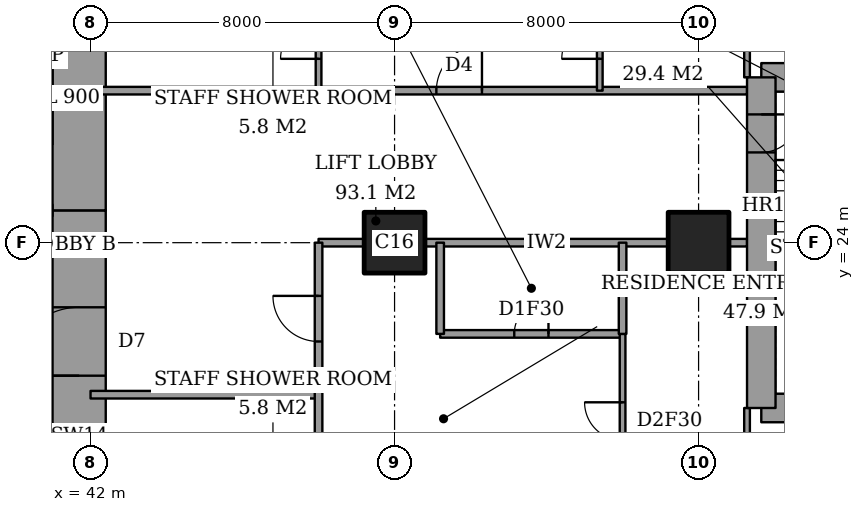
"""IFC4 building model, lengths in metres.
Left out: names, types, materials, properties, quantities, classifications, styles, units other than length and angle.
Written with IfcOpenShell. Run it as: python <this file> out.ifc"""

import sys

from ifc_helpers import new_model, si_unit, direction, frame, frame_2d, origin, origin_2d, place, context, subcontext, project, spatial, rectangle, extrude, element, fill, save


model = new_model("IFC4")
c1 = context("Model", 3, precision=1e-05, world=origin(), true_north=direction((0.0, 1.0)))
c2 = subcontext(c1, "Body", "Model", "MODEL_VIEW")
j1 = project(units=[si_unit("LENGTHUNIT", "METRE"), si_unit("PLANEANGLEUNIT", "RADIAN")], contexts=[c1])
p1 = place(None, origin())
s1 = spatial("IfcSite", under=j1, at=p1, CompositionType="ELEMENT")
p2 = place(p1, origin())
s2 = spatial("IfcBuilding", under=s1, at=p2, CompositionType="ELEMENT")
p3 = place(p2, frame((0.0, 0.0, 270.0)))
s3 = spatial("IfcBuildingStorey", under=s2, at=p3, CompositionType="ELEMENT", Elevation=270.0)
for number, where, z_axis, x_axis in (
    (1, (50.0, 24.0, 0.0), (0.0, 0.0, 1.0), (1.0, 0.0, 0.0)),
    (2, (58.0, 24.0, 0.0), (0.0, 0.0, 1.0), (1.0, 0.0, 0.0)),
):
    element("IfcColumn", number, at=place(p3, frame(where, z_axis=z_axis, x_axis=x_axis)), inside=s3, PredefinedType="COLUMN", context=c2, shape_type="SweptSolid", body=[
        extrude(rectangle(XDim=1.6, YDim=1.6, at=origin_2d()), origin(), (0.0, 0.0, 1.0), 3.6),
    ])
p4 = place(p3, frame((41.7, 13.0, 0.0), z_axis=(0.0, 0.0, 1.0), x_axis=(0.0, 1.0, 0.0)))
e3 = element("IfcWall", 3, at=p4, inside=s3, PredefinedType="SHEAR", context=c2, shape_type="SweptSolid", body=[
    extrude(rectangle(XDim=11.85, YDim=1.4, at=frame_2d((5.925, 0.0))), origin(), (0.0, 0.0, 1.0), 3.6),
])
p5 = place(p4, frame((7.5, 0.0, 0.0)))
e4 = element("IfcOpeningElement", 4, at=p5, cuts=e3, PredefinedType="OPENING", context=c2, shape_type="SweptSolid", body=[
    extrude(rectangle(XDim=1.8, YDim=2.4, at=frame_2d((0.9, 1.2))), frame((0.0, 0.71, 0.0), z_axis=(0.0, -1.0, 0.0), x_axis=(1.0, 0.0, 0.0)), (0.0, 0.0, 1.0), 1.42),
])
p6 = place(p3, frame((41.7, 24.85, 0.0), z_axis=(0.0, 0.0, 1.0), x_axis=(0.0, 1.0, 0.0)))
e5 = element("IfcWall", 5, at=p6, inside=s3, PredefinedType="SHEAR", context=c2, shape_type="SweptSolid", body=[
    extrude(rectangle(XDim=10.15, YDim=1.4, at=frame_2d((5.075, 0.0))), origin(), (0.0, 0.0, 1.0), 3.6),
])
for number, where, z_axis, x_axis in (
    (6, (59.65, 19.65, 0.0), (0.0, 0.0, 1.0), (1.0, 0.0, 0.0)),
    (7, (64.1, 28.35, 0.0), (0.0, 0.0, 1.0), (-1.0, 0.0, 0.0)),
):
    element("IfcWall", number, at=place(p3, frame(where, z_axis=z_axis, x_axis=x_axis)), inside=s3, PredefinedType="SHEAR", context=c2, shape_type="SweptSolid", body=[
        extrude(rectangle(XDim=4.45, YDim=0.75, at=frame_2d((2.225, 0.0))), origin(), (0.0, 0.0, 1.0), 3.6),
    ])
p7 = place(p3, frame((59.65, 28.35, 0.0), z_axis=(0.0, 0.0, 1.0), x_axis=(0.0, -1.0, 0.0)))
e8 = element("IfcWall", 8, at=p7, inside=s3, PredefinedType="SHEAR", context=c2, shape_type="SweptSolid", body=[
    extrude(rectangle(XDim=8.7, YDim=0.75, at=frame_2d((4.35, 0.0))), origin(), (0.0, 0.0, 1.0), 3.6),
])
p8 = place(p7, frame((0.975, 0.0, 0.0)))
e9 = element("IfcOpeningElement", 9, at=p8, cuts=e8, PredefinedType="OPENING", context=c2, shape_type="SweptSolid", body=[
    extrude(rectangle(XDim=1.0, YDim=2.1, at=frame_2d((0.5, 1.05))), frame((0.0, 0.385, 0.0), z_axis=(0.0, -1.0, 0.0), x_axis=(1.0, 0.0, 0.0)), (0.0, 0.0, 1.0), 0.77),
])
p9 = place(p3, frame((42.0, 20.0, 0.0), z_axis=(0.0, 0.0, 1.0), x_axis=(1.0, 0.0, 0.0)))
e10 = element("IfcWall", 10, at=p9, inside=s3, PredefinedType="PARTITIONING", context=c2, shape_type="SweptSolid", body=[
    extrude(rectangle(XDim=6.0, YDim=0.2, at=frame_2d((3.0, 0.0))), origin(), (0.0, 0.0, 1.0), 3.35),
])
p10 = place(p3, frame((51.2, 21.6, 0.0), z_axis=(0.0, 0.0, 1.0), x_axis=(1.0, 0.0, 0.0)))
e11 = element("IfcWall", 11, at=p10, inside=s3, PredefinedType="PARTITIONING", context=c2, shape_type="SweptSolid", body=[
    extrude(rectangle(XDim=4.8, YDim=0.2, at=frame_2d((2.4, 0.0))), origin(), (0.0, 0.0, 1.0), 3.35),
])
p11 = place(p10, frame((1.95, 0.0, 0.0)))
e12 = element("IfcOpeningElement", 12, at=p11, cuts=e11, PredefinedType="OPENING", context=c2, shape_type="SweptSolid", body=[
    extrude(rectangle(XDim=0.9, YDim=2.1, at=frame_2d((0.45, 1.05))), frame((0.0, 0.11, 0.0), z_axis=(0.0, -1.0, 0.0), x_axis=(1.0, 0.0, 0.0)), (0.0, 0.0, 1.0), 0.22),
])
p12 = place(p3, frame((48.0, 24.0, 0.0), z_axis=(0.0, 0.0, 1.0), x_axis=(1.0, 0.0, 0.0)))
e13 = element("IfcWall", 13, at=p12, inside=s3, PredefinedType="PARTITIONING", context=c2, shape_type="SweptSolid", body=[
    extrude(rectangle(XDim=1.2, YDim=0.2, at=frame_2d((0.6, 0.0))), origin(), (0.0, 0.0, 1.0), 3.35),
])
p13 = place(p3, frame((50.8, 24.0, 0.0), z_axis=(0.0, 0.0, 1.0), x_axis=(1.0, 0.0, 0.0)))
e14 = element("IfcWall", 14, at=p13, inside=s3, PredefinedType="PARTITIONING", context=c2, shape_type="SweptSolid", body=[
    extrude(rectangle(XDim=6.4, YDim=0.2, at=frame_2d((3.2, 0.0))), origin(), (0.0, 0.0, 1.0), 3.35),
])
p14 = place(p3, frame((58.8, 24.0, 0.0), z_axis=(0.0, 0.0, 1.0), x_axis=(1.0, 0.0, 0.0)))
e15 = element("IfcWall", 15, at=p14, inside=s3, PredefinedType="PARTITIONING", context=c2, shape_type="SweptSolid", body=[
    extrude(rectangle(XDim=0.475, YDim=0.2, at=frame_2d((0.237, 0.0))), origin(), (0.0, 0.0, 1.0), 3.35),
])
p15 = place(p3, frame((42.0, 28.0, 0.0), z_axis=(0.0, 0.0, 1.0), x_axis=(1.0, 0.0, 0.0)))
e16 = element("IfcWall", 16, at=p15, inside=s3, PredefinedType="PARTITIONING", context=c2, shape_type="SweptSolid", body=[
    extrude(rectangle(XDim=17.275, YDim=0.2, at=frame_2d((8.637, 0.0))), origin(), (0.0, 0.0, 1.0), 3.35),
])
p16 = place(p15, frame((9.1, 0.0, 0.0)))
e17 = element("IfcOpeningElement", 17, at=p16, cuts=e16, PredefinedType="OPENING", context=c2, shape_type="SweptSolid", body=[
    extrude(rectangle(XDim=1.2, YDim=2.4, at=frame_2d((0.6, 1.2))), frame((0.0, 0.11, 0.0), z_axis=(0.0, -1.0, 0.0), x_axis=(1.0, 0.0, 0.0)), (0.0, 0.0, 1.0), 0.22),
])
p17 = place(p3, frame((48.0, 17.0, 0.0), z_axis=(0.0, 0.0, 1.0), x_axis=(0.0, 1.0, 0.0)))
e18 = element("IfcWall", 18, at=p17, inside=s3, PredefinedType="PARTITIONING", context=c2, shape_type="SweptSolid", body=[
    extrude(rectangle(XDim=7.0, YDim=0.2, at=frame_2d((3.5, 0.0))), origin(), (0.0, 0.0, 1.0), 3.35),
])
p18 = place(p17, frame((4.4, 0.0, 0.0)))
e19 = element("IfcOpeningElement", 19, at=p18, cuts=e18, PredefinedType="OPENING", context=c2, shape_type="SweptSolid", body=[
    extrude(rectangle(XDim=1.2, YDim=2.4, at=frame_2d((0.6, 1.2))), frame((0.0, 0.11, 0.0), z_axis=(0.0, -1.0, 0.0), x_axis=(1.0, 0.0, 0.0)), (0.0, 0.0, 1.0), 0.22),
])
p19 = place(p17, frame((1.05, 0.0, 0.0)))
e20 = element("IfcOpeningElement", 20, at=p19, cuts=e18, PredefinedType="OPENING", context=c2, shape_type="SweptSolid", body=[
    extrude(rectangle(XDim=0.9, YDim=2.1, at=frame_2d((0.45, 1.05))), frame((0.0, 0.11, 0.0), z_axis=(0.0, -1.0, 0.0), x_axis=(1.0, 0.0, 0.0)), (0.0, 0.0, 1.0), 0.22),
])
p20 = place(p3, frame((48.0, 28.0, 0.0), z_axis=(0.0, 0.0, 1.0), x_axis=(0.0, 1.0, 0.0)))
e21 = element("IfcWall", 21, at=p20, inside=s3, PredefinedType="PARTITIONING", context=c2, shape_type="SweptSolid", body=[
    extrude(rectangle(XDim=9.4, YDim=0.15, at=frame_2d((4.7, 0.0))), origin(), (0.0, 0.0, 1.0), 3.35),
])
p21 = place(p20, frame((0.837, 0.0, 0.0)))
e22 = element("IfcOpeningElement", 22, at=p21, cuts=e21, PredefinedType="OPENING", context=c2, shape_type="SweptSolid", body=[
    extrude(rectangle(XDim=1.0, YDim=2.1, at=frame_2d((0.5, 1.05))), frame((0.0, 0.085, 0.0), z_axis=(0.0, -1.0, 0.0), x_axis=(1.0, 0.0, 0.0)), (0.0, 0.0, 1.0), 0.17),
])
p22 = place(p3, frame((51.2, 21.6, 0.0), z_axis=(0.0, 0.0, 1.0), x_axis=(0.0, 1.0, 0.0)))
e23 = element("IfcWall", 23, at=p22, inside=s3, PredefinedType="PARTITIONING", context=c2, shape_type="SweptSolid", body=[
    extrude(rectangle(XDim=2.4, YDim=0.2, at=frame_2d((1.2, 0.0))), origin(), (0.0, 0.0, 1.0), 3.35),
])
p23 = place(p3, frame((55.4, 28.0, 0.0), z_axis=(0.0, 0.0, 1.0), x_axis=(0.0, 1.0, 0.0)))
e24 = element("IfcWall", 24, at=p23, inside=s3, PredefinedType="PARTITIONING", context=c2, shape_type="SweptSolid", body=[
    extrude(rectangle(XDim=9.4, YDim=0.15, at=frame_2d((4.7, 0.0))), origin(), (0.0, 0.0, 1.0), 3.35),
])
p24 = place(p23, frame((0.837, 0.0, 0.0)))
e25 = element("IfcOpeningElement", 25, at=p24, cuts=e24, PredefinedType="OPENING", context=c2, shape_type="SweptSolid", body=[
    extrude(rectangle(XDim=1.0, YDim=2.1, at=frame_2d((0.5, 1.05))), frame((0.0, 0.085, 0.0), z_axis=(0.0, -1.0, 0.0), x_axis=(1.0, 0.0, 0.0)), (0.0, 0.0, 1.0), 0.17),
])
p25 = place(p3, frame((56.0, 21.6, 0.0), z_axis=(0.0, 0.0, 1.0), x_axis=(0.0, 1.0, 0.0)))
e26 = element("IfcWall", 26, at=p25, inside=s3, PredefinedType="PARTITIONING", context=c2, shape_type="SweptSolid", body=[
    extrude(rectangle(XDim=2.4, YDim=0.2, at=frame_2d((1.2, 0.0))), origin(), (0.0, 0.0, 1.0), 3.35),
])
p26 = place(p3, frame((56.0, 10.6, 0.0), z_axis=(0.0, 0.0, 1.0), x_axis=(0.0, 1.0, 0.0)))
e27 = element("IfcWall", 27, at=p26, inside=s3, PredefinedType="PARTITIONING", context=c2, shape_type="SweptSolid", body=[
    extrude(rectangle(XDim=11.0, YDim=0.15, at=frame_2d((5.5, 0.0))), origin(), (0.0, 0.0, 1.0), 3.35),
])
p27 = place(p26, frame((8.2, 0.0, 0.0)))
e28 = element("IfcOpeningElement", 28, at=p27, cuts=e27, PredefinedType="OPENING", context=c2, shape_type="SweptSolid", body=[
    extrude(rectangle(XDim=1.0, YDim=2.1, at=frame_2d((0.5, 1.05))), frame((0.0, 0.085, 0.0), z_axis=(0.0, -1.0, 0.0), x_axis=(1.0, 0.0, 0.0)), (0.0, 0.0, 1.0), 0.17),
])
p28 = place(p3, frame((59.275, 17.2, 0.0), z_axis=(0.0, 0.0, 1.0), x_axis=(0.0, 1.0, 0.0)))
e29 = element("IfcWall", 29, at=p28, inside=s3, PredefinedType="PARTITIONING", context=c2, shape_type="SweptSolid", body=[
    extrude(rectangle(XDim=2.45, YDim=0.15, at=frame_2d((1.225, 0.0))), origin(), (0.0, 0.0, 1.0), 3.35),
])
p29 = place(p28, frame((0.538, 0.0, 0.0)))
e30 = element("IfcOpeningElement", 30, at=p29, cuts=e29, PredefinedType="OPENING", context=c2, shape_type="SweptSolid", body=[
    extrude(rectangle(XDim=1.0, YDim=2.1, at=frame_2d((0.5, 1.05))), frame((0.0, 0.085, 0.0), z_axis=(0.0, -1.0, 0.0), x_axis=(1.0, 0.0, 0.0)), (0.0, 0.0, 1.0), 0.17),
])
p30 = place(p3, frame((59.275, 28.35, 0.0), z_axis=(0.0, 0.0, 1.0), x_axis=(0.0, 1.0, 0.0)))
e31 = element("IfcWall", 31, at=p30, inside=s3, PredefinedType="PARTITIONING", context=c2, shape_type="SweptSolid", body=[
    extrude(rectangle(XDim=2.45, YDim=0.15, at=frame_2d((1.225, 0.0))), origin(), (0.0, 0.0, 1.0), 3.35),
])
p31 = place(p30, frame((0.913, 0.0, 0.0)))
e32 = element("IfcOpeningElement", 32, at=p31, cuts=e31, PredefinedType="OPENING", context=c2, shape_type="SweptSolid", body=[
    extrude(rectangle(XDim=1.0, YDim=2.1, at=frame_2d((0.5, 1.05))), frame((0.0, 0.085, 0.0), z_axis=(0.0, -1.0, 0.0), x_axis=(1.0, 0.0, 0.0)), (0.0, 0.0, 1.0), 0.17),
])
p32 = place(p27, origin())
e33 = element("IfcDoor", 33, at=p32, inside=s3, OperationType="SINGLE_SWING_LEFT", PredefinedType="DOOR", context=c2, shape_type="SweptSolid", body=[
    extrude(rectangle(XDim=1.0, YDim=2.1, at=frame_2d((0.5, 1.05))), frame((0.0, 0.025, 0.0), z_axis=(0.0, -1.0, 0.0), x_axis=(1.0, 0.0, 0.0)), (0.0, 0.0, 1.0), 0.05),
])
fill(e28, e33)
p33 = place(p11, origin())
e34 = element("IfcDoor", 34, at=p33, inside=s3, OperationType="SINGLE_SWING_LEFT", PredefinedType="DOOR", context=c2, shape_type="SweptSolid", body=[
    extrude(rectangle(XDim=0.9, YDim=2.1, at=frame_2d((0.45, 1.05))), frame((0.0, 0.025, 0.0), z_axis=(0.0, -1.0, 0.0), x_axis=(1.0, 0.0, 0.0)), (0.0, 0.0, 1.0), 0.05),
])
fill(e12, e34)
p34 = place(p18, origin())
e35 = element("IfcDoor", 35, at=p34, inside=s3, OperationType="SINGLE_SWING_LEFT", PredefinedType="DOOR", context=c2, shape_type="SweptSolid", body=[
    extrude(rectangle(XDim=1.2, YDim=2.4, at=frame_2d((0.6, 1.2))), frame((0.0, 0.025, 0.0), z_axis=(0.0, -1.0, 0.0), x_axis=(1.0, 0.0, 0.0)), (0.0, 0.0, 1.0), 0.05),
])
fill(e19, e35)
p35 = place(p24, origin())
e36 = element("IfcDoor", 36, at=p35, inside=s3, OperationType="SINGLE_SWING_RIGHT", PredefinedType="DOOR", context=c2, shape_type="SweptSolid", body=[
    extrude(rectangle(XDim=1.0, YDim=2.1, at=frame_2d((0.5, 1.05))), frame((0.0, 0.025, 0.0), z_axis=(0.0, -1.0, 0.0), x_axis=(1.0, 0.0, 0.0)), (0.0, 0.0, 1.0), 0.05),
])
fill(e25, e36)
p36 = place(p16, origin())
e37 = element("IfcDoor", 37, at=p36, inside=s3, OperationType="SINGLE_SWING_LEFT", PredefinedType="DOOR", context=c2, shape_type="SweptSolid", body=[
    extrude(rectangle(XDim=1.2, YDim=2.4, at=frame_2d((0.6, 1.2))), frame((0.0, 0.025, 0.0), z_axis=(0.0, -1.0, 0.0), x_axis=(1.0, 0.0, 0.0)), (0.0, 0.0, 1.0), 0.05),
])
fill(e17, e37)
p37 = place(p21, origin())
e38 = element("IfcDoor", 38, at=p37, inside=s3, OperationType="SINGLE_SWING_RIGHT", PredefinedType="DOOR", context=c2, shape_type="SweptSolid", body=[
    extrude(rectangle(XDim=1.0, YDim=2.1, at=frame_2d((0.5, 1.05))), frame((0.0, 0.025, 0.0), z_axis=(0.0, -1.0, 0.0), x_axis=(1.0, 0.0, 0.0)), (0.0, 0.0, 1.0), 0.05),
])
fill(e22, e38)
p38 = place(p5, origin())
e39 = element("IfcDoor", 39, at=p38, inside=s3, OperationType="DOUBLE_DOOR_DOUBLE_SWING", PredefinedType="DOOR", context=c2, shape_type="SweptSolid", body=[
    extrude(rectangle(XDim=1.8, YDim=2.4, at=frame_2d((0.9, 1.2))), frame((0.0, 0.025, 0.0), z_axis=(0.0, -1.0, 0.0), x_axis=(1.0, 0.0, 0.0)), (0.0, 0.0, 1.0), 0.05),
])
fill(e4, e39)
p39 = place(p8, origin())
e40 = element("IfcDoor", 40, at=p39, inside=s3, OperationType="SINGLE_SWING_RIGHT", PredefinedType="DOOR", context=c2, shape_type="SweptSolid", body=[
    extrude(rectangle(XDim=1.0, YDim=2.1, at=frame_2d((0.5, 1.05))), frame((0.0, 0.025, 0.0), z_axis=(0.0, -1.0, 0.0), x_axis=(1.0, 0.0, 0.0)), (0.0, 0.0, 1.0), 0.05),
])
fill(e9, e40)
save(model, sys.argv[1])
